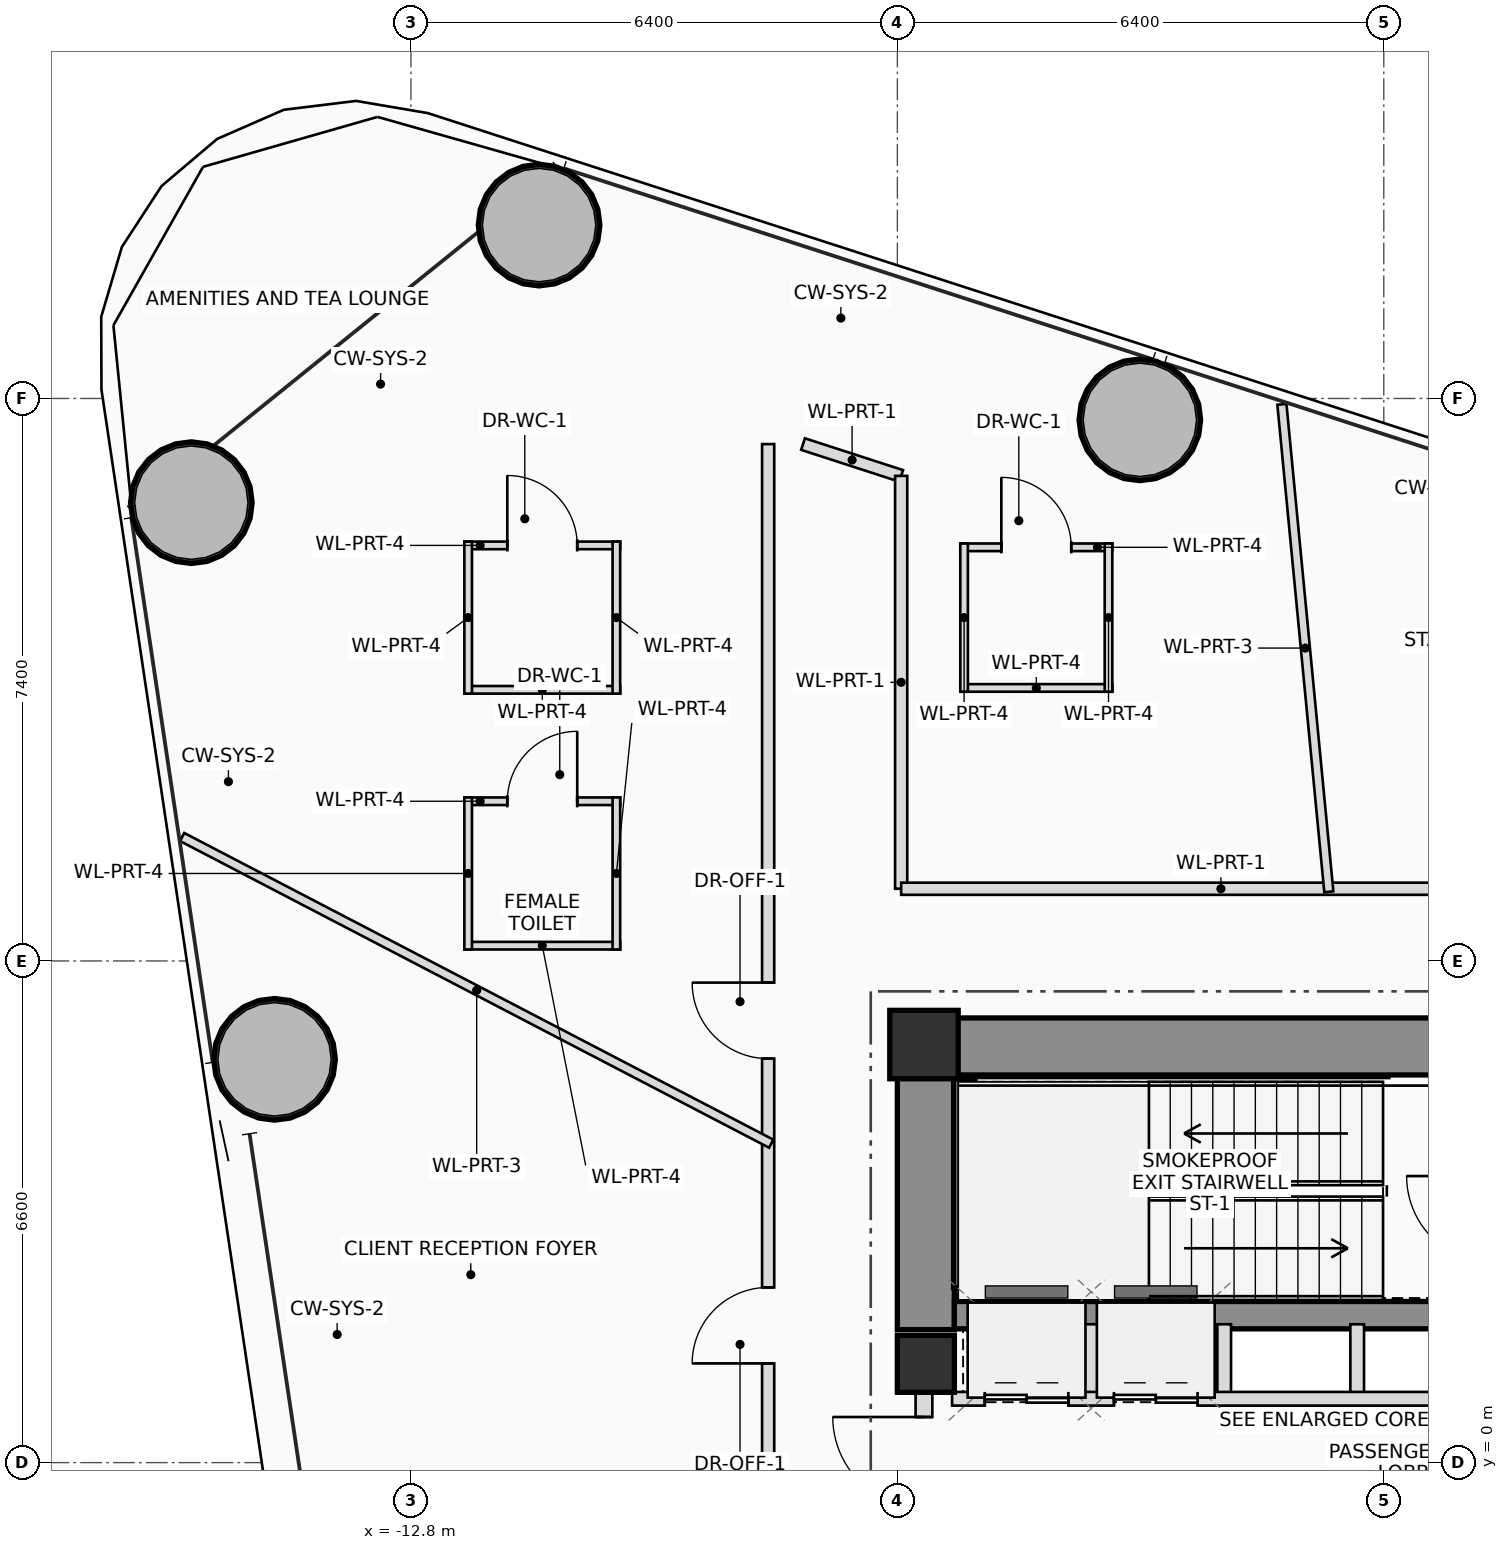
"""IFC4 building model, lengths in metres.
Left out: names, types, materials, properties, quantities, classifications, styles, units other than length and angle.
Written with IfcOpenShell. Run it as: python <this file> out.ifc"""

import sys

from ifc_helpers import new_model, si_unit, direction, frame, frame_2d, origin, origin_2d, place, context, subcontext, project, spatial, rectangle, hollow_circle, extrude, source, transform, mapped, element, fill, save


model = new_model("IFC4")
c1 = context("Model", 3, precision=1e-05, world=origin(), true_north=direction((0.0, 1.0)))
c2 = subcontext(c1, "Body", "Model", "MODEL_VIEW")
j1 = project(units=[si_unit("LENGTHUNIT", "METRE"), si_unit("PLANEANGLEUNIT", "RADIAN")], contexts=[c1])
p1 = place(None, origin())
s1 = spatial("IfcSite", under=j1, at=p1, CompositionType="ELEMENT")
p2 = place(p1, origin())
s2 = spatial("IfcBuilding", under=s1, at=p2, CompositionType="ELEMENT")
p3 = place(p2, frame((0.0, 0.0, 66.05)))
s3 = spatial("IfcBuildingStorey", under=s2, at=p3, CompositionType="ELEMENT", Elevation=66.05)
m1 = source(origin(), c2, "Body", "SweptSolid", [
    extrude(rectangle(XDim=0.9, YDim=0.9, at=origin_2d()), origin(), (0.0, 0.0, 1.0), 3.75),
])
p4 = place(p3, frame((-6.05, 5.5, 0.0), z_axis=(0.0, 0.0, 1.0), x_axis=(1.0, 0.0, 0.0)))
e1 = element("IfcColumn", 1, at=p4, inside=s3, PredefinedType="COLUMN", context=c2, shape_type="MappedRepresentation", body=[
    mapped(m1, transform((0.0, 0.0, 0.0), scale=1.0)),
])
p5 = place(p3, frame((-6.4, 5.475, 0.0), z_axis=(0.0, 0.0, 1.0), x_axis=(1.0, 0.0, 0.0)))
e2 = element("IfcWall", 2, at=p5, inside=s3, PredefinedType="SHEAR", context=c2, shape_type="SweptSolid", body=[
    extrude(rectangle(XDim=12.8, YDim=0.75, at=frame_2d((6.4, 0.0))), origin(), (0.0, 0.0, 1.0), 3.75),
])
p6 = place(p5, frame((8.6, 0.0, 0.0)))
e3 = element("IfcOpeningElement", 3, at=p6, cuts=e2, PredefinedType="OPENING", context=c2, shape_type="SweptSolid", body=[
    extrude(rectangle(XDim=1.2, YDim=2.2, at=frame_2d((0.6, 1.1))), frame((0.0, 0.385, 0.0), z_axis=(0.0, -1.0, 0.0), x_axis=(1.0, 0.0, 0.0)), (0.0, 0.0, 1.0), 0.77),
])
p7 = place(p3, frame((-6.025, 1.75, 0.0), z_axis=(0.0, 0.0, 1.0), x_axis=(0.0, 1.0, 0.0)))
e4 = element("IfcWall", 4, at=p7, inside=s3, PredefinedType="SHEAR", context=c2, shape_type="SweptSolid", body=[
    extrude(rectangle(XDim=3.35, YDim=0.75, at=frame_2d((1.675, 0.0))), origin(), (0.0, 0.0, 1.0), 3.75),
])
p8 = place(p3, frame((-5.65, 1.94, 0.0), z_axis=(0.0, 0.0, 1.0), x_axis=(1.0, 0.0, 0.0)))
e5 = element("IfcWall", 5, at=p8, inside=s3, PredefinedType="SHEAR", context=c2, shape_type="SweptSolid", body=[
    extrude(rectangle(XDim=11.3, YDim=0.36, at=frame_2d((5.65, 0.0))), origin(), (0.0, 0.0, 1.0), 3.75),
])
p9 = place(p3, frame((-5.52, 2.3, 0.0), z_axis=(0.0, 0.0, 1.0), x_axis=(0.0, 1.0, 0.0)))
e6 = element("IfcWall", 6, at=p9, inside=s3, PredefinedType="SHEAR", context=c2, shape_type="SweptSolid", body=[
    extrude(rectangle(XDim=2.75, YDim=0.28, at=frame_2d((1.375, 0.0))), origin(), (0.0, 0.0, 1.0), 3.75),
])
m2 = source(origin(), c2, "Body", "SweptSolid", [
    extrude(rectangle(XDim=0.75, YDim=0.75, at=origin_2d()), origin(), (0.0, 0.0, 1.0), 3.75),
])
p10 = place(p3, frame((-6.025, 1.3, 0.0), z_axis=(0.0, 0.0, 1.0), x_axis=(1.0, 0.0, 0.0)))
e7 = element("IfcColumn", 7, at=p10, inside=s3, PredefinedType="COLUMN", context=c2, shape_type="MappedRepresentation", body=[
    mapped(m2, transform((0.0, 0.0, 0.0), scale=1.0)),
])
m3 = source(origin(), c2, "Body", "SweptSolid", [
    extrude(hollow_circle(Radius=0.8, WallThickness=0.055, at=origin_2d()), origin(), (0.0, 0.0, 1.0), 3.75),
])
for number, where, z_axis, x_axis in (
    (8, (-3.21, 13.719, 0.0), (0.0, 0.0, 1.0), (1.0, 0.0, 0.0)),
    (9, (-11.114, 16.281, 0.0), (0.0, 0.0, 1.0), (1.0, 0.0, 0.0)),
    (10, (-15.689, 12.629, 0.0), (0.0, 0.0, 1.0), (1.0, 0.0, 0.0)),
    (11, (-14.594, 5.306, 0.0), (0.0, 0.0, 1.0), (1.0, 0.0, 0.0)),
):
    element("IfcColumn", number, at=place(p3, frame(where, z_axis=z_axis, x_axis=x_axis)), inside=s3, PredefinedType="COLUMN", context=c2, shape_type="MappedRepresentation", body=[
        mapped(m3, transform((0.0, 0.0, 0.0), scale=1.0)),
    ])
p11 = place(p3, frame((-6.05, -0.95, 0.0), z_axis=(0.0, 0.0, 1.0), x_axis=(0.0, 1.0, 0.0)))
e12 = element("IfcWall", 12, at=p11, inside=s3, PredefinedType="PLUMBINGWALL", context=c2, shape_type="SweptSolid", body=[
    extrude(rectangle(XDim=1.9, YDim=0.22, at=frame_2d((0.95, 0.0))), origin(), (0.0, 0.0, 1.0), 2.525),
])
p12 = place(p11, frame((0.35, 0.0, 0.0)))
e13 = element("IfcOpeningElement", 13, at=p12, cuts=e12, PredefinedType="OPENING", context=c2, shape_type="SweptSolid", body=[
    extrude(rectangle(XDim=1.2, YDim=2.2, at=frame_2d((0.6, 1.1))), frame((0.0, 0.12, 0.0), z_axis=(0.0, -1.0, 0.0), x_axis=(1.0, 0.0, 0.0)), (0.0, 0.0, 1.0), 0.24),
])
for number, where, z_axis, x_axis in (
    (14, (-3.85, 0.84, 0.0), (0.0, 0.0, 1.0), (0.0, 1.0, 0.0)),
    (15, (-2.1, 0.84, 0.0), (0.0, 0.0, 1.0), (0.0, 1.0, 0.0)),
    (16, (-0.35, 0.84, 0.0), (0.0, 0.0, 1.0), (0.0, 1.0, 0.0)),
):
    element("IfcWall", number, at=place(p3, frame(where, z_axis=z_axis, x_axis=x_axis)), inside=s3, PredefinedType="PLUMBINGWALL", context=c2, shape_type="SweptSolid", body=[
        extrude(rectangle(XDim=0.98, YDim=0.18, at=frame_2d((0.49, 0.0))), origin(), (0.0, 0.0, 1.0), 3.545),
    ])
p13 = place(p3, frame((-5.68, 0.84, 0.0), z_axis=(0.0, 0.0, 1.0), x_axis=(1.0, 0.0, 0.0)))
e17 = element("IfcWall", 17, at=p13, inside=s3, PredefinedType="PLUMBINGWALL", context=c2, shape_type="SweptSolid", body=[
    extrude(rectangle(XDim=11.33, YDim=0.18, at=frame_2d((5.665, 0.0))), origin(), (0.0, 0.0, 1.0), 3.545),
])
p14 = place(p13, frame((0.43, 0.0, 0.0)))
e18 = element("IfcOpeningElement", 18, at=p14, cuts=e17, PredefinedType="OPENING", context=c2, shape_type="SweptSolid", body=[
    extrude(rectangle(XDim=1.1, YDim=2.2, at=frame_2d((0.55, 1.1))), frame((0.0, 0.1, 0.0), z_axis=(0.0, -1.0, 0.0), x_axis=(1.0, 0.0, 0.0)), (0.0, 0.0, 1.0), 0.2),
])
p15 = place(p13, frame((2.13, 0.0, 0.0)))
e19 = element("IfcOpeningElement", 19, at=p15, cuts=e17, PredefinedType="OPENING", context=c2, shape_type="SweptSolid", body=[
    extrude(rectangle(XDim=1.1, YDim=2.2, at=frame_2d((0.55, 1.1))), frame((0.0, 0.1, 0.0), z_axis=(0.0, -1.0, 0.0), x_axis=(1.0, 0.0, 0.0)), (0.0, 0.0, 1.0), 0.2),
])
p16 = place(p3, frame((-12.097, 12.067, 0.0), z_axis=(0.0, 0.0, 1.0), x_axis=(1.0, 0.0, 0.0)))
e20 = element("IfcWall", 20, at=p16, inside=s3, PredefinedType="PARTITIONING", context=c2, shape_type="SweptSolid", body=[
    extrude(rectangle(XDim=2.05, YDim=0.1, at=frame_2d((1.025, 0.0))), origin(), (0.0, 0.0, 1.0), 3.2),
])
p17 = place(p16, frame((0.565, 0.0, 0.0)))
e21 = element("IfcOpeningElement", 21, at=p17, cuts=e20, PredefinedType="OPENING", context=c2, shape_type="SweptSolid", body=[
    extrude(rectangle(XDim=0.92, YDim=2.1, at=frame_2d((0.46, 1.05))), frame((0.0, 0.06, 0.0), z_axis=(0.0, -1.0, 0.0), x_axis=(1.0, 0.0, 0.0)), (0.0, 0.0, 1.0), 0.12),
])
p18 = place(p3, frame((-10.047, 10.167, 0.0), z_axis=(0.0, 0.0, 1.0), x_axis=(-1.0, 0.0, 0.0)))
e22 = element("IfcWall", 22, at=p18, inside=s3, PredefinedType="PARTITIONING", context=c2, shape_type="SweptSolid", body=[
    extrude(rectangle(XDim=2.05, YDim=0.1, at=frame_2d((1.025, 0.0))), origin(), (0.0, 0.0, 1.0), 3.545),
])
p19 = place(p3, frame((-10.097, 12.117, 0.0), z_axis=(0.0, 0.0, 1.0), x_axis=(0.0, -1.0, 0.0)))
e23 = element("IfcWall", 23, at=p19, inside=s3, PredefinedType="PARTITIONING", context=c2, shape_type="SweptSolid", body=[
    extrude(rectangle(XDim=2.0, YDim=0.1, at=frame_2d((1.0, 0.0))), origin(), (0.0, 0.0, 1.0), 3.545),
])
p20 = place(p3, frame((-12.047, 10.117, 0.0), z_axis=(0.0, 0.0, 1.0), x_axis=(0.0, 1.0, 0.0)))
e24 = element("IfcWall", 24, at=p20, inside=s3, PredefinedType="PARTITIONING", context=c2, shape_type="SweptSolid", body=[
    extrude(rectangle(XDim=2.0, YDim=0.1, at=frame_2d((1.0, 0.0))), origin(), (0.0, 0.0, 1.0), 3.2),
])
p21 = place(p3, frame((-12.097, 8.701, 0.0), z_axis=(0.0, 0.0, 1.0), x_axis=(1.0, 0.0, 0.0)))
e25 = element("IfcWall", 25, at=p21, inside=s3, PredefinedType="PARTITIONING", context=c2, shape_type="SweptSolid", body=[
    extrude(rectangle(XDim=2.05, YDim=0.1, at=frame_2d((1.025, 0.0))), origin(), (0.0, 0.0, 1.0), 2.85),
])
p22 = place(p21, frame((0.565, 0.0, 0.0)))
e26 = element("IfcOpeningElement", 26, at=p22, cuts=e25, PredefinedType="OPENING", context=c2, shape_type="SweptSolid", body=[
    extrude(rectangle(XDim=0.92, YDim=2.1, at=frame_2d((0.46, 1.05))), frame((0.0, 0.06, 0.0), z_axis=(0.0, -1.0, 0.0), x_axis=(1.0, 0.0, 0.0)), (0.0, 0.0, 1.0), 0.12),
])
p23 = place(p3, frame((-10.047, 6.801, 0.0), z_axis=(0.0, 0.0, 1.0), x_axis=(-1.0, 0.0, 0.0)))
e27 = element("IfcWall", 27, at=p23, inside=s3, PredefinedType="PARTITIONING", context=c2, shape_type="SweptSolid", body=[
    extrude(rectangle(XDim=2.05, YDim=0.1, at=frame_2d((1.025, 0.0))), origin(), (0.0, 0.0, 1.0), 3.05),
])
p24 = place(p3, frame((-10.097, 8.751, 0.0), z_axis=(0.0, 0.0, 1.0), x_axis=(0.0, -1.0, 0.0)))
e28 = element("IfcWall", 28, at=p24, inside=s3, PredefinedType="PARTITIONING", context=c2, shape_type="SweptSolid", body=[
    extrude(rectangle(XDim=2.0, YDim=0.1, at=frame_2d((1.0, 0.0))), origin(), (0.0, 0.0, 1.0), 2.85),
])
p25 = place(p3, frame((-12.047, 6.751, 0.0), z_axis=(0.0, 0.0, 1.0), x_axis=(0.0, 1.0, 0.0)))
e29 = element("IfcWall", 29, at=p25, inside=s3, PredefinedType="PARTITIONING", context=c2, shape_type="SweptSolid", body=[
    extrude(rectangle(XDim=2.0, YDim=0.1, at=frame_2d((1.0, 0.0))), origin(), (0.0, 0.0, 1.0), 3.545),
])
p26 = place(p3, frame((-5.572, 12.042, 0.0), z_axis=(0.0, 0.0, 1.0), x_axis=(1.0, 0.0, 0.0)))
e30 = element("IfcWall", 30, at=p26, inside=s3, PredefinedType="PARTITIONING", context=c2, shape_type="SweptSolid", body=[
    extrude(rectangle(XDim=2.0, YDim=0.1, at=frame_2d((1.0, 0.0))), origin(), (0.0, 0.0, 1.0), 2.85),
])
p27 = place(p26, frame((0.54, 0.0, 0.0)))
e31 = element("IfcOpeningElement", 31, at=p27, cuts=e30, PredefinedType="OPENING", context=c2, shape_type="SweptSolid", body=[
    extrude(rectangle(XDim=0.92, YDim=2.1, at=frame_2d((0.46, 1.05))), frame((0.0, 0.06, 0.0), z_axis=(0.0, -1.0, 0.0), x_axis=(1.0, 0.0, 0.0)), (0.0, 0.0, 1.0), 0.12),
])
p28 = place(p3, frame((-3.572, 10.192, 0.0), z_axis=(0.0, 0.0, 1.0), x_axis=(-1.0, 0.0, 0.0)))
e32 = element("IfcWall", 32, at=p28, inside=s3, PredefinedType="PARTITIONING", context=c2, shape_type="SweptSolid", body=[
    extrude(rectangle(XDim=2.0, YDim=0.1, at=frame_2d((1.0, 0.0))), origin(), (0.0, 0.0, 1.0), 2.85),
])
p29 = place(p3, frame((-3.622, 12.092, 0.0), z_axis=(0.0, 0.0, 1.0), x_axis=(0.0, -1.0, 0.0)))
e33 = element("IfcWall", 33, at=p29, inside=s3, PredefinedType="PARTITIONING", context=c2, shape_type="SweptSolid", body=[
    extrude(rectangle(XDim=1.95, YDim=0.1, at=frame_2d((0.975, 0.0))), origin(), (0.0, 0.0, 1.0), 2.85),
])
p30 = place(p3, frame((-5.522, 10.142, 0.0), z_axis=(0.0, 0.0, 1.0), x_axis=(0.0, 1.0, 0.0)))
e34 = element("IfcWall", 34, at=p30, inside=s3, PredefinedType="PARTITIONING", context=c2, shape_type="SweptSolid", body=[
    extrude(rectangle(XDim=1.95, YDim=0.1, at=frame_2d((0.975, 0.0))), origin(), (0.0, 0.0, 1.0), 3.2),
])
p31 = place(p3, frame((-8.1, -7.55, 0.0), z_axis=(0.0, 0.0, 1.0), x_axis=(0.0, 1.0, 0.0)))
e35 = element("IfcWall", 35, at=p31, inside=s3, PredefinedType="PARTITIONING", context=c2, shape_type="SweptSolid", body=[
    extrude(rectangle(XDim=15.1, YDim=0.16, at=frame_2d((7.55, 0.0))), origin(), (0.0, 0.0, 1.0), 2.85),
])
p32 = place(p31, frame((8.855, 0.0, 0.0)))
e36 = element("IfcOpeningElement", 36, at=p32, cuts=e35, PredefinedType="OPENING", context=c2, shape_type="SweptSolid", body=[
    extrude(rectangle(XDim=1.0, YDim=2.25, at=frame_2d((0.5, 1.125))), frame((0.0, 0.09, 0.0), z_axis=(0.0, -1.0, 0.0), x_axis=(1.0, 0.0, 0.0)), (0.0, 0.0, 1.0), 0.18),
])
p33 = place(p31, frame((12.865, 0.0, 0.0)))
e37 = element("IfcOpeningElement", 37, at=p33, cuts=e35, PredefinedType="OPENING", context=c2, shape_type="SweptSolid", body=[
    extrude(rectangle(XDim=1.0, YDim=2.25, at=frame_2d((0.5, 1.125))), frame((0.0, 0.09, 0.0), z_axis=(0.0, -1.0, 0.0), x_axis=(1.0, 0.0, 0.0)), (0.0, 0.0, 1.0), 0.18),
])
p34 = place(p3, frame((-8.1, 7.55, 0.0), z_axis=(0.0, 0.0, 1.0), x_axis=(0.0, 1.0, 0.0)))
e38 = element("IfcWall", 38, at=p34, inside=s3, PredefinedType="PARTITIONING", context=c2, shape_type="SweptSolid", body=[
    extrude(rectangle(XDim=5.85, YDim=0.16, at=frame_2d((2.925, 0.0))), origin(), (0.0, 0.0, 1.0), 2.85),
])
p35 = place(p3, frame((-7.641, 13.4, 0.0), z_axis=(0.0, 0.0, 1.0), x_axis=(0.951277022007, -0.308337521884, 0.0)))
e39 = element("IfcWall", 39, at=p35, inside=s3, PredefinedType="PARTITIONING", context=c2, shape_type="SweptSolid", body=[
    extrude(rectangle(XDim=1.357, YDim=0.16, at=frame_2d((0.679, 0.0))), origin(), (0.0, 0.0, 1.0), 3.545),
])
p36 = place(p3, frame((-6.35, 12.981, 0.0), z_axis=(0.0, 0.0, 1.0), x_axis=(0.0, -1.0, 0.0)))
e40 = element("IfcWall", 40, at=p36, inside=s3, PredefinedType="PARTITIONING", context=c2, shape_type="SweptSolid", body=[
    extrude(rectangle(XDim=5.431, YDim=0.16, at=frame_2d((2.716, 0.0))), origin(), (0.0, 0.0, 1.0), 3.05),
])
p37 = place(p3, frame((-6.35, 7.55, 0.0), z_axis=(0.0, 0.0, 1.0), x_axis=(1.0, 0.0, 0.0)))
e41 = element("IfcWall", 41, at=p37, inside=s3, PredefinedType="PARTITIONING", context=c2, shape_type="SweptSolid", body=[
    extrude(rectangle(XDim=12.7, YDim=0.16, at=frame_2d((6.35, 0.0))), origin(), (0.0, 0.0, 1.0), 2.85),
])
p38 = place(p37, frame((8.564, 0.0, 0.0)))
e42 = element("IfcOpeningElement", 42, at=p38, cuts=e41, PredefinedType="OPENING", context=c2, shape_type="SweptSolid", body=[
    extrude(rectangle(XDim=1.0, YDim=2.25, at=frame_2d((0.5, 1.125))), frame((0.0, 0.09, 0.0), z_axis=(0.0, -1.0, 0.0), x_axis=(1.0, 0.0, 0.0)), (0.0, 0.0, 1.0), 0.18),
])
p39 = place(p3, frame((-0.723, 7.51, 0.0), z_axis=(0.0, 0.0, 1.0), x_axis=(-0.095840941038, 0.995396661648, 0.0)))
e43 = element("IfcWall", 43, at=p39, inside=s3, PredefinedType="PARTITIONING", context=c2, shape_type="SweptSolid", body=[
    extrude(rectangle(XDim=6.442, YDim=0.12, at=frame_2d((3.221, 0.0))), origin(), (0.0, 0.0, 1.0), 3.01),
])
p40 = place(p3, frame((-8.06, 4.196, 0.0), z_axis=(0.0, 0.0, 1.0), x_axis=(-0.887015422537, 0.461739797052, 0.0)))
e44 = element("IfcWall", 44, at=p40, inside=s3, PredefinedType="PARTITIONING", context=c2, shape_type="SweptSolid", body=[
    extrude(rectangle(XDim=8.738, YDim=0.12, at=frame_2d((4.369, 0.0))), origin(), (0.0, 0.0, 1.0), 2.85),
])
p41 = place(p12, origin())
e45 = element("IfcDoor", 45, at=p41, inside=s3, OperationType="SINGLE_SWING_RIGHT", PredefinedType="DOOR", context=c2, shape_type="SweptSolid", body=[
    extrude(rectangle(XDim=1.2, YDim=2.2, at=frame_2d((0.6, 1.1))), frame((0.0, 0.025, 0.0), z_axis=(0.0, -1.0, 0.0), x_axis=(1.0, 0.0, 0.0)), (0.0, 0.0, 1.0), 0.05),
])
fill(e13, e45)
p42 = place(p14, origin())
e46 = element("IfcDoor", 46, at=p42, inside=s3, OperationType="DOUBLE_DOOR_SLIDING", PredefinedType="DOOR", context=c2, shape_type="SweptSolid", body=[
    extrude(rectangle(XDim=1.1, YDim=2.2, at=frame_2d((0.55, 1.1))), frame((0.0, 0.025, 0.0), z_axis=(0.0, -1.0, 0.0), x_axis=(1.0, 0.0, 0.0)), (0.0, 0.0, 1.0), 0.05),
])
fill(e18, e46)
p43 = place(p15, origin())
e47 = element("IfcDoor", 47, at=p43, inside=s3, OperationType="DOUBLE_DOOR_SLIDING", PredefinedType="DOOR", context=c2, shape_type="SweptSolid", body=[
    extrude(rectangle(XDim=1.1, YDim=2.2, at=frame_2d((0.55, 1.1))), frame((0.0, 0.025, 0.0), z_axis=(0.0, -1.0, 0.0), x_axis=(1.0, 0.0, 0.0)), (0.0, 0.0, 1.0), 0.05),
])
fill(e19, e47)
p44 = place(p17, origin())
e48 = element("IfcDoor", 48, at=p44, inside=s3, OperationType="SINGLE_SWING_LEFT", PredefinedType="DOOR", context=c2, shape_type="SweptSolid", body=[
    extrude(rectangle(XDim=0.92, YDim=2.1, at=frame_2d((0.46, 1.05))), frame((0.0, 0.025, 0.0), z_axis=(0.0, -1.0, 0.0), x_axis=(1.0, 0.0, 0.0)), (0.0, 0.0, 1.0), 0.05),
])
fill(e21, e48)
p45 = place(p22, origin())
e49 = element("IfcDoor", 49, at=p45, inside=s3, OperationType="SINGLE_SWING_RIGHT", PredefinedType="DOOR", context=c2, shape_type="SweptSolid", body=[
    extrude(rectangle(XDim=0.92, YDim=2.1, at=frame_2d((0.46, 1.05))), frame((0.0, 0.025, 0.0), z_axis=(0.0, -1.0, 0.0), x_axis=(1.0, 0.0, 0.0)), (0.0, 0.0, 1.0), 0.05),
])
fill(e26, e49)
p46 = place(p27, origin())
e50 = element("IfcDoor", 50, at=p46, inside=s3, OperationType="SINGLE_SWING_LEFT", PredefinedType="DOOR", context=c2, shape_type="SweptSolid", body=[
    extrude(rectangle(XDim=0.92, YDim=2.1, at=frame_2d((0.46, 1.05))), frame((0.0, 0.025, 0.0), z_axis=(0.0, -1.0, 0.0), x_axis=(1.0, 0.0, 0.0)), (0.0, 0.0, 1.0), 0.05),
])
fill(e31, e50)
p47 = place(p32, origin())
e51 = element("IfcDoor", 51, at=p47, inside=s3, OperationType="SINGLE_SWING_LEFT", PredefinedType="DOOR", context=c2, shape_type="SweptSolid", body=[
    extrude(rectangle(XDim=1.0, YDim=2.25, at=frame_2d((0.5, 1.125))), frame((0.0, 0.025, 0.0), z_axis=(0.0, -1.0, 0.0), x_axis=(1.0, 0.0, 0.0)), (0.0, 0.0, 1.0), 0.05),
])
fill(e36, e51)
p48 = place(p33, origin())
e52 = element("IfcDoor", 52, at=p48, inside=s3, OperationType="SINGLE_SWING_RIGHT", PredefinedType="DOOR", context=c2, shape_type="SweptSolid", body=[
    extrude(rectangle(XDim=1.0, YDim=2.25, at=frame_2d((0.5, 1.125))), frame((0.0, 0.025, 0.0), z_axis=(0.0, -1.0, 0.0), x_axis=(1.0, 0.0, 0.0)), (0.0, 0.0, 1.0), 0.05),
])
fill(e37, e52)
save(model, sys.argv[1])
